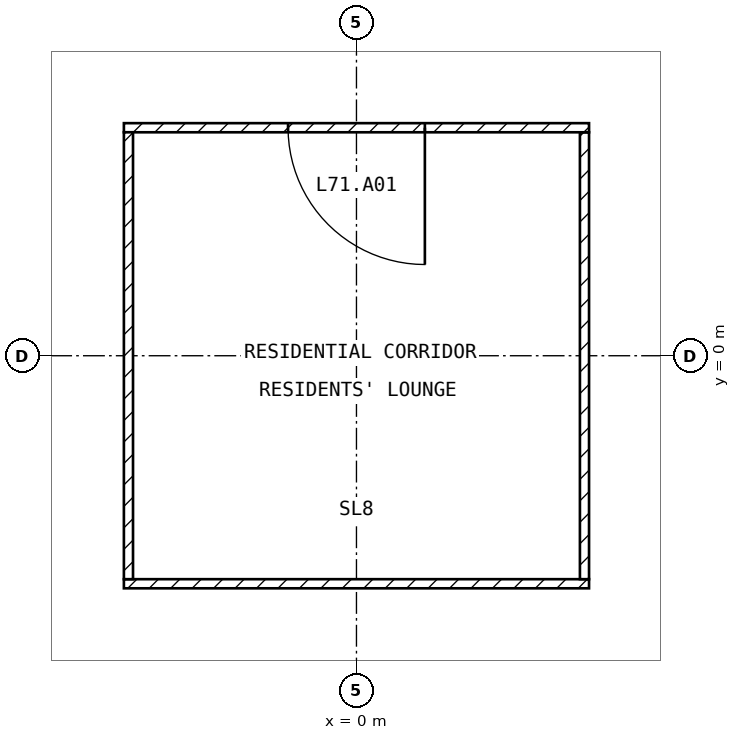
"""IFC4 building model, lengths in metres.
Left out: names, types, materials, properties, quantities, classifications, styles, units other than length and angle.
Written with IfcOpenShell. Run it as: python <this file> out.ifc"""

import sys

from ifc_helpers import new_model, si_unit, direction, frame, frame_2d, origin, place, context, subcontext, project, spatial, rectangle, extrude, element, fill, save


model = new_model("IFC4")
c1 = context("Model", 3, precision=1e-05, world=origin(), true_north=direction((0.0, 1.0)))
c2 = subcontext(c1, "Body", "Model", "MODEL_VIEW")
j1 = project(units=[si_unit("LENGTHUNIT", "METRE"), si_unit("PLANEANGLEUNIT", "RADIAN")], contexts=[c1])
p1 = place(None, origin())
s1 = spatial("IfcSite", under=j1, at=p1, CompositionType="ELEMENT")
p2 = place(p1, origin())
s2 = spatial("IfcBuilding", under=s1, at=p2, CompositionType="ELEMENT")
p3 = place(p2, frame((0.0, 0.0, 278.0)))
s3 = spatial("IfcBuildingStorey", under=s2, at=p3, CompositionType="ELEMENT", Elevation=278.0)
p4 = place(p3, frame((-3.06, -3.0, 0.0), z_axis=(0.0, 0.0, 1.0), x_axis=(1.0, 0.0, 0.0)))
e1 = element("IfcWall", 1, at=p4, inside=s3, PredefinedType="PARTITIONING", context=c2, shape_type="SweptSolid", body=[
    extrude(rectangle(XDim=6.12, YDim=0.12, at=frame_2d((3.06, 0.0))), origin(), (0.0, 0.0, 1.0), 3.25),
])
p5 = place(p3, frame((3.0, -2.94, 0.0), z_axis=(0.0, 0.0, 1.0), x_axis=(0.0, 1.0, 0.0)))
e2 = element("IfcWall", 2, at=p5, inside=s3, PredefinedType="PARTITIONING", context=c2, shape_type="SweptSolid", body=[
    extrude(rectangle(XDim=5.88, YDim=0.12, at=frame_2d((2.94, 0.0))), origin(), (0.0, 0.0, 1.0), 3.25),
])
p6 = place(p3, frame((3.06, 3.0, 0.0), z_axis=(0.0, 0.0, 1.0), x_axis=(-1.0, 0.0, 0.0)))
e3 = element("IfcWall", 3, at=p6, inside=s3, PredefinedType="PARTITIONING", context=c2, shape_type="SweptSolid", body=[
    extrude(rectangle(XDim=6.12, YDim=0.12, at=frame_2d((3.06, 0.0))), origin(), (0.0, 0.0, 1.0), 3.25),
])
p7 = place(p6, frame((2.16, 0.0, 0.0)))
e4 = element("IfcOpeningElement", 4, at=p7, cuts=e3, PredefinedType="OPENING", context=c2, shape_type="SweptSolid", body=[
    extrude(rectangle(XDim=1.8, YDim=2.1, at=frame_2d((0.9, 1.05))), frame((0.0, 0.07, 0.0), z_axis=(0.0, -1.0, 0.0), x_axis=(1.0, 0.0, 0.0)), (0.0, 0.0, 1.0), 0.14),
])
p8 = place(p3, frame((-3.0, 2.94, 0.0), z_axis=(0.0, 0.0, 1.0), x_axis=(0.0, -1.0, 0.0)))
e5 = element("IfcWall", 5, at=p8, inside=s3, PredefinedType="PARTITIONING", context=c2, shape_type="SweptSolid", body=[
    extrude(rectangle(XDim=5.88, YDim=0.12, at=frame_2d((2.94, 0.0))), origin(), (0.0, 0.0, 1.0), 3.25),
])
p9 = place(p7, origin())
e6 = element("IfcDoor", 6, at=p9, inside=s3, OperationType="SINGLE_SWING_LEFT", PredefinedType="DOOR", context=c2, shape_type="SweptSolid", body=[
    extrude(rectangle(XDim=1.8, YDim=2.1, at=frame_2d((0.9, 1.05))), frame((0.0, 0.025, 0.0), z_axis=(0.0, -1.0, 0.0), x_axis=(1.0, 0.0, 0.0)), (0.0, 0.0, 1.0), 0.05),
])
fill(e4, e6)
save(model, sys.argv[1])
